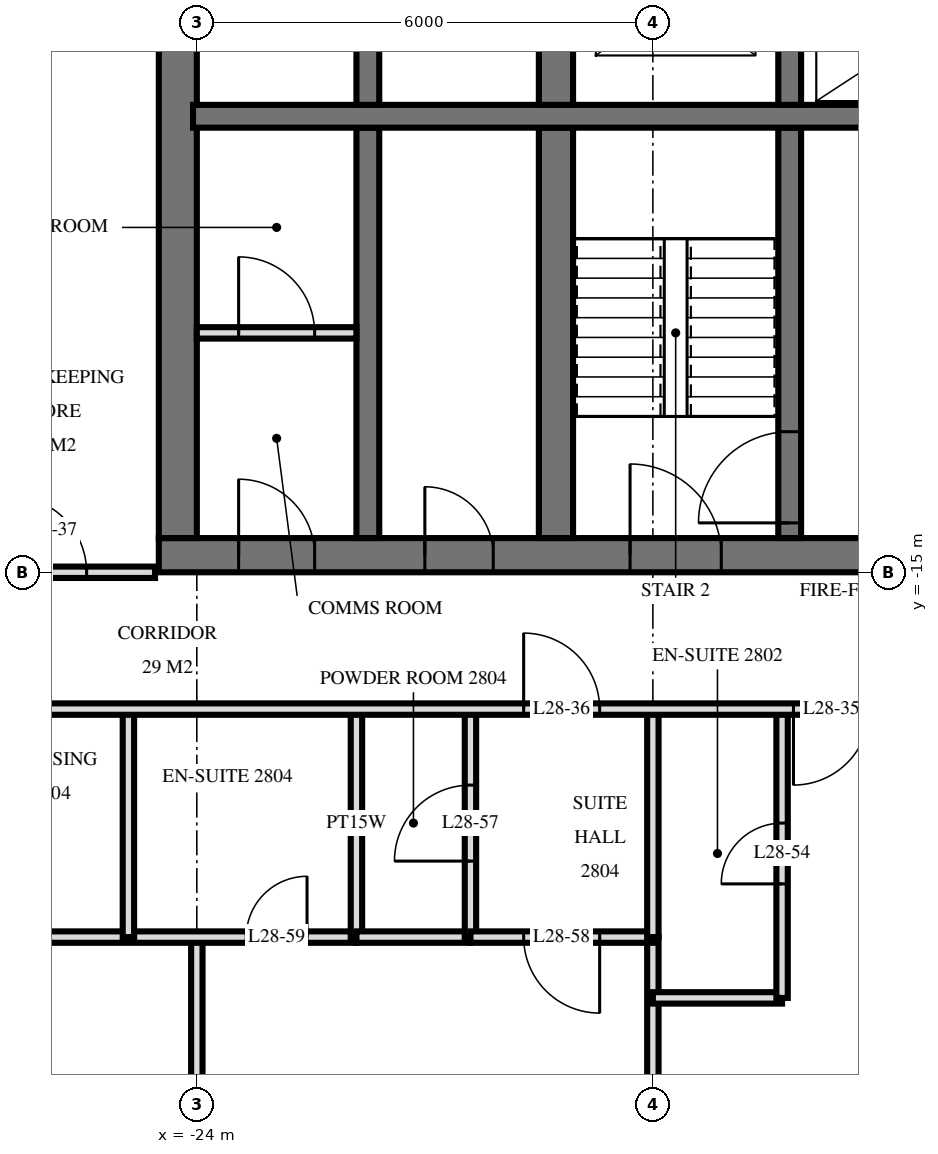
"""IFC4 building model, lengths in metres.
Left out: names, types, materials, properties, quantities, classifications, styles, units other than length and angle.
Written with IfcOpenShell. Run it as: python <this file> out.ifc"""

import sys

from ifc_helpers import new_model, si_unit, direction, frame, frame_2d, origin, place, context, subcontext, project, spatial, rectangle, extrude, element, fill, save


model = new_model("IFC4")
c1 = context("Model", 3, precision=1e-05, world=origin(), true_north=direction((0.0, 1.0)))
c2 = subcontext(c1, "Body", "Model", "MODEL_VIEW")
j1 = project(units=[si_unit("LENGTHUNIT", "METRE"), si_unit("PLANEANGLEUNIT", "RADIAN")], contexts=[c1])
p1 = place(None, origin())
s1 = spatial("IfcSite", under=j1, at=p1, CompositionType="ELEMENT")
p2 = place(p1, origin())
s2 = spatial("IfcBuilding", under=s1, at=p2, CompositionType="ELEMENT")
p3 = place(p2, frame((0.0, 0.0, 112.8)))
s3 = spatial("IfcBuildingStorey", under=s2, at=p3, CompositionType="ELEMENT", Elevation=112.8)
p4 = place(p3, frame((-24.5, -14.775, 0.0), z_axis=(0.0, 0.0, 1.0), x_axis=(1.0, 0.0, 0.0)))
e1 = element("IfcWall", 1, at=p4, inside=s3, PredefinedType="SHEAR", context=c2, shape_type="SweptSolid", body=[
    extrude(rectangle(XDim=14.5, YDim=0.45, at=frame_2d((7.25, 0.0))), origin(), (0.0, 0.0, 1.0), 3.6),
])
p5 = place(p4, frame((6.2, 0.0, 0.0)))
e2 = element("IfcOpeningElement", 2, at=p5, cuts=e1, PredefinedType="OPENING", context=c2, shape_type="SweptSolid", body=[
    extrude(rectangle(XDim=1.2, YDim=2.1, at=frame_2d((0.6, 1.05))), frame((0.0, 0.235, 0.0), z_axis=(0.0, -1.0, 0.0), x_axis=(1.0, 0.0, 0.0)), (0.0, 0.0, 1.0), 0.47),
])
p6 = place(p4, frame((9.25, 0.0, 0.0)))
e3 = element("IfcOpeningElement", 3, at=p6, cuts=e1, PredefinedType="OPENING", context=c2, shape_type="SweptSolid", body=[
    extrude(rectangle(XDim=1.1, YDim=2.1, at=frame_2d((0.55, 1.05))), frame((0.0, 0.235, 0.0), z_axis=(0.0, -1.0, 0.0), x_axis=(1.0, 0.0, 0.0)), (0.0, 0.0, 1.0), 0.47),
])
p7 = place(p4, frame((3.5, 0.0, 0.0)))
e4 = element("IfcOpeningElement", 4, at=p7, cuts=e1, PredefinedType="OPENING", context=c2, shape_type="SweptSolid", body=[
    extrude(rectangle(XDim=0.9, YDim=2.1, at=frame_2d((0.45, 1.05))), frame((0.0, 0.235, 0.0), z_axis=(0.0, -1.0, 0.0), x_axis=(1.0, 0.0, 0.0)), (0.0, 0.0, 1.0), 0.47),
])
p8 = place(p4, frame((1.05, 0.0, 0.0)))
e5 = element("IfcOpeningElement", 5, at=p8, cuts=e1, PredefinedType="OPENING", context=c2, shape_type="SweptSolid", body=[
    extrude(rectangle(XDim=1.0, YDim=2.1, at=frame_2d((0.5, 1.05))), frame((0.0, 0.235, 0.0), z_axis=(0.0, -1.0, 0.0), x_axis=(1.0, 0.0, 0.0)), (0.0, 0.0, 1.0), 0.47),
])
p9 = place(p3, frame((-24.25, -14.55, 0.0), z_axis=(0.0, 0.0, 1.0), x_axis=(0.0, 1.0, 0.0)))
e6 = element("IfcWall", 6, at=p9, inside=s3, PredefinedType="SHEAR", context=c2, shape_type="SweptSolid", body=[
    extrude(rectangle(XDim=14.1, YDim=0.5, at=frame_2d((7.05, 0.0))), origin(), (0.0, 0.0, 1.0), 3.6),
])
p10 = place(p3, frame((-24.05, -9.0, 0.0), z_axis=(0.0, 0.0, 1.0), x_axis=(1.0, 0.0, 0.0)))
e7 = element("IfcWall", 7, at=p10, inside=s3, PredefinedType="SHEAR", context=c2, shape_type="SweptSolid", body=[
    extrude(rectangle(XDim=13.7, YDim=0.3, at=frame_2d((6.85, 0.0))), origin(), (0.0, 0.0, 1.0), 3.6),
])
p11 = place(p10, frame((8.8, 0.0, 0.0)))
e8 = element("IfcOpeningElement", 8, at=p11, cuts=e7, PredefinedType="OPENING", context=c2, shape_type="SweptSolid", body=[
    extrude(rectangle(XDim=1.1, YDim=2.1, at=frame_2d((0.55, 1.05))), frame((0.0, 0.16, 0.0), z_axis=(0.0, -1.0, 0.0), x_axis=(1.0, 0.0, 0.0)), (0.0, 0.0, 1.0), 0.32),
])
p12 = place(p3, frame((-16.2, -8.85, 0.0), z_axis=(0.0, 0.0, 1.0), x_axis=(0.0, 1.0, 0.0)))
e9 = element("IfcWall", 9, at=p12, inside=s3, PredefinedType="SHEAR", context=c2, shape_type="SweptSolid", body=[
    extrude(rectangle(XDim=2.3, YDim=0.3, at=frame_2d((1.15, 0.0))), origin(), (0.0, 0.0, 1.0), 3.6),
])
p13 = place(p3, frame((-16.2, -14.55, 0.0), z_axis=(0.0, 0.0, 1.0), x_axis=(0.0, 1.0, 0.0)))
e10 = element("IfcWall", 10, at=p13, inside=s3, PredefinedType="SHEAR", context=c2, shape_type="SweptSolid", body=[
    extrude(rectangle(XDim=5.4, YDim=0.3, at=frame_2d((2.7, 0.0))), origin(), (0.0, 0.0, 1.0), 3.6),
])
p14 = place(p13, frame((0.2, 0.0, 0.0)))
e11 = element("IfcOpeningElement", 11, at=p14, cuts=e10, PredefinedType="OPENING", context=c2, shape_type="SweptSolid", body=[
    extrude(rectangle(XDim=1.2, YDim=2.1, at=frame_2d((0.6, 1.05))), frame((0.0, 0.16, 0.0), z_axis=(0.0, -1.0, 0.0), x_axis=(1.0, 0.0, 0.0)), (0.0, 0.0, 1.0), 0.32),
])
p15 = place(p3, frame((-19.275, -8.85, 0.0), z_axis=(0.0, 0.0, 1.0), x_axis=(0.0, 1.0, 0.0)))
e12 = element("IfcWall", 12, at=p15, inside=s3, PredefinedType="SHEAR", context=c2, shape_type="SweptSolid", body=[
    extrude(rectangle(XDim=2.3, YDim=0.45, at=frame_2d((1.15, 0.0))), origin(), (0.0, 0.0, 1.0), 3.6),
])
p16 = place(p3, frame((-19.275, -14.55, 0.0), z_axis=(0.0, 0.0, 1.0), x_axis=(0.0, 1.0, 0.0)))
e13 = element("IfcWall", 13, at=p16, inside=s3, PredefinedType="SHEAR", context=c2, shape_type="SweptSolid", body=[
    extrude(rectangle(XDim=5.4, YDim=0.45, at=frame_2d((2.7, 0.0))), origin(), (0.0, 0.0, 1.0), 3.6),
])
p17 = place(p3, frame((-21.75, -8.85, 0.0), z_axis=(0.0, 0.0, 1.0), x_axis=(0.0, 1.0, 0.0)))
e14 = element("IfcWall", 14, at=p17, inside=s3, PredefinedType="SHEAR", context=c2, shape_type="SweptSolid", body=[
    extrude(rectangle(XDim=2.3, YDim=0.3, at=frame_2d((1.15, 0.0))), origin(), (0.0, 0.0, 1.0), 3.6),
])
p18 = place(p3, frame((-21.75, -14.55, 0.0), z_axis=(0.0, 0.0, 1.0), x_axis=(0.0, 1.0, 0.0)))
e15 = element("IfcWall", 15, at=p18, inside=s3, PredefinedType="SHEAR", context=c2, shape_type="SweptSolid", body=[
    extrude(rectangle(XDim=5.4, YDim=0.3, at=frame_2d((2.7, 0.0))), origin(), (0.0, 0.0, 1.0), 3.6),
])
p19 = place(p3, frame((-24.0, -11.85, 0.0), z_axis=(0.0, 0.0, 1.0), x_axis=(1.0, 0.0, 0.0)))
e16 = element("IfcWall", 16, at=p19, inside=s3, PredefinedType="PARTITIONING", context=c2, shape_type="SweptSolid", body=[
    extrude(rectangle(XDim=2.1, YDim=0.15, at=frame_2d((1.05, 0.0))), origin(), (0.0, 0.0, 1.0), 3.3),
])
p20 = place(p19, frame((0.55, 0.0, 0.0)))
e17 = element("IfcOpeningElement", 17, at=p20, cuts=e16, PredefinedType="OPENING", context=c2, shape_type="SweptSolid", body=[
    extrude(rectangle(XDim=1.0, YDim=2.1, at=frame_2d((0.5, 1.05))), frame((0.0, 0.085, 0.0), z_axis=(0.0, -1.0, 0.0), x_axis=(1.0, 0.0, 0.0)), (0.0, 0.0, 1.0), 0.17),
])
p21 = place(p3, frame((-16.3, -20.6, 0.0), z_axis=(0.0, 0.0, 1.0), x_axis=(0.0, 1.0, 0.0)))
e18 = element("IfcWall", 18, at=p21, inside=s3, PredefinedType="PARTITIONING", context=c2, shape_type="SweptSolid", body=[
    extrude(rectangle(XDim=3.8, YDim=0.15, at=frame_2d((1.9, 0.0))), origin(), (0.0, 0.0, 1.0), 3.32),
])
p22 = place(p21, frame((1.5, 0.0, 0.0)))
e19 = element("IfcOpeningElement", 19, at=p22, cuts=e18, PredefinedType="OPENING", context=c2, shape_type="SweptSolid", body=[
    extrude(rectangle(XDim=0.8, YDim=2.1, at=frame_2d((0.4, 1.05))), frame((0.0, 0.085, 0.0), z_axis=(0.0, -1.0, 0.0), x_axis=(1.0, 0.0, 0.0)), (0.0, 0.0, 1.0), 0.17),
])
p23 = place(p3, frame((-18.0, -19.8, 0.0), z_axis=(0.0, 0.0, 1.0), x_axis=(0.0, 1.0, 0.0)))
e20 = element("IfcWall", 20, at=p23, inside=s3, PredefinedType="PARTITIONING", context=c2, shape_type="SweptSolid", body=[
    extrude(rectangle(XDim=3.0, YDim=0.15, at=frame_2d((1.5, 0.0))), origin(), (0.0, 0.0, 1.0), 3.32),
])
p24 = place(p3, frame((-18.0, -33.62, 0.0), z_axis=(0.0, 0.0, 1.0), x_axis=(0.0, 1.0, 0.0)))
e21 = element("IfcWall", 21, at=p24, inside=s3, PredefinedType="PARTITIONING", context=c2, shape_type="SweptSolid", body=[
    extrude(rectangle(XDim=13.82, YDim=0.15, at=frame_2d((6.91, 0.0))), origin(), (0.0, 0.0, 1.0), 3.32),
])
p25 = place(p3, frame((-20.4, -19.8, 0.0), z_axis=(0.0, 0.0, 1.0), x_axis=(0.0, 1.0, 0.0)))
e22 = element("IfcWall", 22, at=p25, inside=s3, PredefinedType="PARTITIONING", context=c2, shape_type="SweptSolid", body=[
    extrude(rectangle(XDim=3.0, YDim=0.15, at=frame_2d((1.5, 0.0))), origin(), (0.0, 0.0, 1.0), 3.32),
])
p26 = place(p25, frame((1.0, 0.0, 0.0)))
e23 = element("IfcOpeningElement", 23, at=p26, cuts=e22, PredefinedType="OPENING", context=c2, shape_type="SweptSolid", body=[
    extrude(rectangle(XDim=1.0, YDim=2.1, at=frame_2d((0.5, 1.05))), frame((0.0, 0.085, 0.0), z_axis=(0.0, -1.0, 0.0), x_axis=(1.0, 0.0, 0.0)), (0.0, 0.0, 1.0), 0.17),
])
p27 = place(p3, frame((-21.9, -19.8, 0.0), z_axis=(0.0, 0.0, 1.0), x_axis=(0.0, 1.0, 0.0)))
e24 = element("IfcWall", 24, at=p27, inside=s3, PredefinedType="PLUMBINGWALL", context=c2, shape_type="SweptSolid", body=[
    extrude(rectangle(XDim=3.0, YDim=0.15, at=frame_2d((1.5, 0.0))), origin(), (0.0, 0.0, 1.0), 3.32),
])
p28 = place(p3, frame((-24.0, -33.557, 0.0), z_axis=(0.0, 0.0, 1.0), x_axis=(0.0, 1.0, 0.0)))
e25 = element("IfcWall", 25, at=p28, inside=s3, PredefinedType="PARTITIONING", context=c2, shape_type="SweptSolid", body=[
    extrude(rectangle(XDim=13.757, YDim=0.15, at=frame_2d((6.878, 0.0))), origin(), (0.0, 0.0, 1.0), 3.32),
])
p29 = place(p28, frame((6.337, 0.0, 0.0)))
e26 = element("IfcOpeningElement", 26, at=p29, cuts=e25, PredefinedType="OPENING", context=c2, shape_type="SweptSolid", body=[
    extrude(rectangle(XDim=0.9, YDim=2.1, at=frame_2d((0.45, 1.05))), frame((0.0, 0.085, 0.0), z_axis=(0.0, -1.0, 0.0), x_axis=(1.0, 0.0, 0.0)), (0.0, 0.0, 1.0), 0.17),
])
p30 = place(p3, frame((-24.9, -19.8, 0.0), z_axis=(0.0, 0.0, 1.0), x_axis=(0.0, 1.0, 0.0)))
e27 = element("IfcWall", 27, at=p30, inside=s3, PredefinedType="PARTITIONING", context=c2, shape_type="SweptSolid", body=[
    extrude(rectangle(XDim=3.0, YDim=0.15, at=frame_2d((1.5, 0.0))), origin(), (0.0, 0.0, 1.0), 3.32),
])
p31 = place(p3, frame((-18.0, -20.6, 0.0), z_axis=(0.0, 0.0, 1.0), x_axis=(1.0, 0.0, 0.0)))
e28 = element("IfcWall", 28, at=p31, inside=s3, PredefinedType="PARTITIONING", context=c2, shape_type="SweptSolid", body=[
    extrude(rectangle(XDim=1.7, YDim=0.15, at=frame_2d((0.85, 0.0))), origin(), (0.0, 0.0, 1.0), 3.32),
])
p32 = place(p3, frame((-20.4, -19.8, 0.0), z_axis=(0.0, 0.0, 1.0), x_axis=(1.0, 0.0, 0.0)))
e29 = element("IfcWall", 29, at=p32, inside=s3, PredefinedType="PARTITIONING", context=c2, shape_type="SweptSolid", body=[
    extrude(rectangle(XDim=2.4, YDim=0.15, at=frame_2d((1.2, 0.0))), origin(), (0.0, 0.0, 1.0), 3.32),
])
p33 = place(p32, frame((0.7, 0.0, 0.0)))
e30 = element("IfcOpeningElement", 30, at=p33, cuts=e29, PredefinedType="OPENING", context=c2, shape_type="SweptSolid", body=[
    extrude(rectangle(XDim=1.0, YDim=2.1, at=frame_2d((0.5, 1.05))), frame((0.0, 0.085, 0.0), z_axis=(0.0, -1.0, 0.0), x_axis=(1.0, 0.0, 0.0)), (0.0, 0.0, 1.0), 0.17),
])
p34 = place(p3, frame((-28.02, -19.8, 0.0), z_axis=(0.0, 0.0, 1.0), x_axis=(1.0, 0.0, 0.0)))
e31 = element("IfcWall", 31, at=p34, inside=s3, PredefinedType="PARTITIONING", context=c2, shape_type="SweptSolid", body=[
    extrude(rectangle(XDim=6.12, YDim=0.15, at=frame_2d((3.06, 0.0))), origin(), (0.0, 0.0, 1.0), 3.32),
])
p35 = place(p34, frame((4.67, 0.0, 0.0)))
e32 = element("IfcOpeningElement", 32, at=p35, cuts=e31, PredefinedType="OPENING", context=c2, shape_type="SweptSolid", body=[
    extrude(rectangle(XDim=0.8, YDim=2.1, at=frame_2d((0.4, 1.05))), frame((0.0, 0.085, 0.0), z_axis=(0.0, -1.0, 0.0), x_axis=(1.0, 0.0, 0.0)), (0.0, 0.0, 1.0), 0.17),
])
p36 = place(p34, frame((1.02, 0.0, 0.0)))
e33 = element("IfcOpeningElement", 33, at=p36, cuts=e31, PredefinedType="OPENING", context=c2, shape_type="SweptSolid", body=[
    extrude(rectangle(XDim=0.9, YDim=2.1, at=frame_2d((0.45, 1.05))), frame((0.0, 0.085, 0.0), z_axis=(0.0, -1.0, 0.0), x_axis=(1.0, 0.0, 0.0)), (0.0, 0.0, 1.0), 0.17),
])
p37 = place(p3, frame((-21.9, -19.8, 0.0), z_axis=(0.0, 0.0, 1.0), x_axis=(1.0, 0.0, 0.0)))
e34 = element("IfcWall", 34, at=p37, inside=s3, PredefinedType="PLUMBINGWALL", context=c2, shape_type="SweptSolid", body=[
    extrude(rectangle(XDim=1.5, YDim=0.15, at=frame_2d((0.75, 0.0))), origin(), (0.0, 0.0, 1.0), 3.32),
])
p38 = place(p3, frame((-28.02, -16.8, 0.0), z_axis=(0.0, 0.0, 1.0), x_axis=(1.0, 0.0, 0.0)))
e35 = element("IfcWall", 35, at=p38, inside=s3, PredefinedType="PARTITIONING", context=c2, shape_type="SweptSolid", body=[
    extrude(rectangle(XDim=56.04, YDim=0.15, at=frame_2d((28.02, 0.0))), origin(), (0.0, 0.0, 1.0), 3.32),
])
p39 = place(p38, frame((13.17, 0.0, 0.0)))
e36 = element("IfcOpeningElement", 36, at=p39, cuts=e35, PredefinedType="OPENING", context=c2, shape_type="SweptSolid", body=[
    extrude(rectangle(XDim=1.0, YDim=2.1, at=frame_2d((0.5, 1.05))), frame((0.0, 0.085, 0.0), z_axis=(0.0, -1.0, 0.0), x_axis=(1.0, 0.0, 0.0)), (0.0, 0.0, 1.0), 0.17),
])
p40 = place(p38, frame((11.87, 0.0, 0.0)))
e37 = element("IfcOpeningElement", 37, at=p40, cuts=e35, PredefinedType="OPENING", context=c2, shape_type="SweptSolid", body=[
    extrude(rectangle(XDim=1.0, YDim=2.1, at=frame_2d((0.5, 1.05))), frame((0.0, 0.085, 0.0), z_axis=(0.0, -1.0, 0.0), x_axis=(1.0, 0.0, 0.0)), (0.0, 0.0, 1.0), 0.17),
])
p41 = place(p38, frame((8.32, 0.0, 0.0)))
e38 = element("IfcOpeningElement", 38, at=p41, cuts=e35, PredefinedType="OPENING", context=c2, shape_type="SweptSolid", body=[
    extrude(rectangle(XDim=1.0, YDim=2.1, at=frame_2d((0.5, 1.05))), frame((0.0, 0.085, 0.0), z_axis=(0.0, -1.0, 0.0), x_axis=(1.0, 0.0, 0.0)), (0.0, 0.0, 1.0), 0.17),
])
p42 = place(p38, frame((40.42, 0.0, 0.0)))
e39 = element("IfcOpeningElement", 39, at=p42, cuts=e35, PredefinedType="OPENING", context=c2, shape_type="SweptSolid", body=[
    extrude(rectangle(XDim=1.0, YDim=2.1, at=frame_2d((0.5, 1.05))), frame((0.0, 0.085, 0.0), z_axis=(0.0, -1.0, 0.0), x_axis=(1.0, 0.0, 0.0)), (0.0, 0.0, 1.0), 0.17),
])
p43 = place(p38, frame((46.72, 0.0, 0.0)))
e40 = element("IfcOpeningElement", 40, at=p43, cuts=e35, PredefinedType="OPENING", context=c2, shape_type="SweptSolid", body=[
    extrude(rectangle(XDim=1.0, YDim=2.1, at=frame_2d((0.5, 1.05))), frame((0.0, 0.085, 0.0), z_axis=(0.0, -1.0, 0.0), x_axis=(1.0, 0.0, 0.0)), (0.0, 0.0, 1.0), 0.17),
])
p44 = place(p38, frame((21.52, 0.0, 0.0)))
e41 = element("IfcOpeningElement", 41, at=p44, cuts=e35, PredefinedType="OPENING", context=c2, shape_type="SweptSolid", body=[
    extrude(rectangle(XDim=1.0, YDim=2.1, at=frame_2d((0.5, 1.05))), frame((0.0, 0.085, 0.0), z_axis=(0.0, -1.0, 0.0), x_axis=(1.0, 0.0, 0.0)), (0.0, 0.0, 1.0), 0.17),
])
p45 = place(p38, frame((30.52, 0.0, 0.0)))
e42 = element("IfcOpeningElement", 42, at=p45, cuts=e35, PredefinedType="OPENING", context=c2, shape_type="SweptSolid", body=[
    extrude(rectangle(XDim=1.0, YDim=2.1, at=frame_2d((0.5, 1.05))), frame((0.0, 0.085, 0.0), z_axis=(0.0, -1.0, 0.0), x_axis=(1.0, 0.0, 0.0)), (0.0, 0.0, 1.0), 0.17),
])
p46 = place(p38, frame((36.52, 0.0, 0.0)))
e43 = element("IfcOpeningElement", 43, at=p46, cuts=e35, PredefinedType="OPENING", context=c2, shape_type="SweptSolid", body=[
    extrude(rectangle(XDim=1.0, YDim=2.1, at=frame_2d((0.5, 1.05))), frame((0.0, 0.085, 0.0), z_axis=(0.0, -1.0, 0.0), x_axis=(1.0, 0.0, 0.0)), (0.0, 0.0, 1.0), 0.17),
])
p47 = place(p3, frame((-28.02, -15.0, 0.0), z_axis=(0.0, 0.0, 1.0), x_axis=(1.0, 0.0, 0.0)))
e44 = element("IfcWall", 44, at=p47, inside=s3, PredefinedType="PARTITIONING", context=c2, shape_type="SweptSolid", body=[
    extrude(rectangle(XDim=3.47, YDim=0.15, at=frame_2d((1.735, 0.0))), origin(), (0.0, 0.0, 1.0), 3.32),
])
p48 = place(p47, frame((1.57, 0.0, 0.0)))
e45 = element("IfcOpeningElement", 45, at=p48, cuts=e44, PredefinedType="OPENING", context=c2, shape_type="SweptSolid", body=[
    extrude(rectangle(XDim=1.0, YDim=2.1, at=frame_2d((0.5, 1.05))), frame((0.0, 0.085, 0.0), z_axis=(0.0, -1.0, 0.0), x_axis=(1.0, 0.0, 0.0)), (0.0, 0.0, 1.0), 0.17),
])
p49 = place(p5, origin())
e46 = element("IfcDoor", 46, at=p49, inside=s3, OperationType="SINGLE_SWING_RIGHT", PredefinedType="DOOR", context=c2, shape_type="SweptSolid", body=[
    extrude(rectangle(XDim=1.2, YDim=2.1, at=frame_2d((0.6, 1.05))), frame((0.0, 0.025, 0.0), z_axis=(0.0, -1.0, 0.0), x_axis=(1.0, 0.0, 0.0)), (0.0, 0.0, 1.0), 0.05),
])
fill(e2, e46)
p50 = place(p7, origin())
e47 = element("IfcDoor", 47, at=p50, inside=s3, OperationType="SINGLE_SWING_RIGHT", PredefinedType="DOOR", context=c2, shape_type="SweptSolid", body=[
    extrude(rectangle(XDim=0.9, YDim=2.1, at=frame_2d((0.45, 1.05))), frame((0.0, 0.025, 0.0), z_axis=(0.0, -1.0, 0.0), x_axis=(1.0, 0.0, 0.0)), (0.0, 0.0, 1.0), 0.05),
])
fill(e4, e47)
p51 = place(p8, origin())
e48 = element("IfcDoor", 48, at=p51, inside=s3, OperationType="SINGLE_SWING_RIGHT", PredefinedType="DOOR", context=c2, shape_type="SweptSolid", body=[
    extrude(rectangle(XDim=1.0, YDim=2.1, at=frame_2d((0.5, 1.05))), frame((0.0, 0.025, 0.0), z_axis=(0.0, -1.0, 0.0), x_axis=(1.0, 0.0, 0.0)), (0.0, 0.0, 1.0), 0.05),
])
fill(e5, e48)
p52 = place(p14, origin())
e49 = element("IfcDoor", 49, at=p52, inside=s3, OperationType="SINGLE_SWING_RIGHT", PredefinedType="DOOR", context=c2, shape_type="SweptSolid", body=[
    extrude(rectangle(XDim=1.2, YDim=2.1, at=frame_2d((0.6, 1.05))), frame((0.0, 0.025, 0.0), z_axis=(0.0, -1.0, 0.0), x_axis=(1.0, 0.0, 0.0)), (0.0, 0.0, 1.0), 0.05),
])
fill(e11, e49)
p53 = place(p20, origin())
e50 = element("IfcDoor", 50, at=p53, inside=s3, OperationType="SINGLE_SWING_RIGHT", PredefinedType="DOOR", context=c2, shape_type="SweptSolid", body=[
    extrude(rectangle(XDim=1.0, YDim=2.1, at=frame_2d((0.5, 1.05))), frame((0.0, 0.025, 0.0), z_axis=(0.0, -1.0, 0.0), x_axis=(1.0, 0.0, 0.0)), (0.0, 0.0, 1.0), 0.05),
])
fill(e17, e50)
p54 = place(p40, frame((0.5, 0.0, 0.0), z_axis=(0.0, 0.0, 1.0), x_axis=(-1.0, 0.0, 0.0)))
e51 = element("IfcDoor", 51, at=p54, inside=s3, OperationType="SINGLE_SWING_LEFT", PredefinedType="DOOR", context=c2, shape_type="SweptSolid", body=[
    extrude(rectangle(XDim=1.0, YDim=2.1, at=frame_2d((0.0, 1.05))), frame((0.0, -0.025, 0.0), z_axis=(0.0, 1.0, 0.0), x_axis=(-1.0, 0.0, 0.0)), (0.0, 0.0, 1.0), 0.05),
])
fill(e37, e51)
p55 = place(p41, origin())
e52 = element("IfcDoor", 52, at=p55, inside=s3, OperationType="SINGLE_SWING_RIGHT", PredefinedType="DOOR", context=c2, shape_type="SweptSolid", body=[
    extrude(rectangle(XDim=1.0, YDim=2.1, at=frame_2d((0.5, 1.05))), frame((0.0, 0.025, 0.0), z_axis=(0.0, -1.0, 0.0), x_axis=(1.0, 0.0, 0.0)), (0.0, 0.0, 1.0), 0.05),
])
fill(e38, e52)
p56 = place(p48, origin())
e53 = element("IfcDoor", 53, at=p56, inside=s3, OperationType="SINGLE_SWING_RIGHT", PredefinedType="DOOR", context=c2, shape_type="SweptSolid", body=[
    extrude(rectangle(XDim=1.0, YDim=2.1, at=frame_2d((0.5, 1.05))), frame((0.0, 0.025, 0.0), z_axis=(0.0, -1.0, 0.0), x_axis=(1.0, 0.0, 0.0)), (0.0, 0.0, 1.0), 0.05),
])
fill(e45, e53)
p57 = place(p22, origin())
e54 = element("IfcDoor", 54, at=p57, inside=s3, OperationType="SINGLE_SWING_RIGHT", PredefinedType="DOOR", context=c2, shape_type="SweptSolid", body=[
    extrude(rectangle(XDim=0.8, YDim=2.1, at=frame_2d((0.4, 1.05))), frame((0.0, 0.025, 0.0), z_axis=(0.0, -1.0, 0.0), x_axis=(1.0, 0.0, 0.0)), (0.0, 0.0, 1.0), 0.05),
])
fill(e19, e54)
p58 = place(p26, origin())
e55 = element("IfcDoor", 55, at=p58, inside=s3, OperationType="SINGLE_SWING_RIGHT", PredefinedType="DOOR", context=c2, shape_type="SweptSolid", body=[
    extrude(rectangle(XDim=1.0, YDim=2.1, at=frame_2d((0.5, 1.05))), frame((0.0, 0.025, 0.0), z_axis=(0.0, -1.0, 0.0), x_axis=(1.0, 0.0, 0.0)), (0.0, 0.0, 1.0), 0.05),
])
fill(e23, e55)
p59 = place(p33, frame((0.5, 0.0, 0.0), z_axis=(0.0, 0.0, 1.0), x_axis=(-1.0, 0.0, 0.0)))
e56 = element("IfcDoor", 56, at=p59, inside=s3, OperationType="SINGLE_SWING_RIGHT", PredefinedType="DOOR", context=c2, shape_type="SweptSolid", body=[
    extrude(rectangle(XDim=1.0, YDim=2.1, at=frame_2d((0.0, 1.05))), frame((0.0, -0.025, 0.0), z_axis=(0.0, 1.0, 0.0), x_axis=(-1.0, 0.0, 0.0)), (0.0, 0.0, 1.0), 0.05),
])
fill(e30, e56)
p60 = place(p35, origin())
e57 = element("IfcDoor", 57, at=p60, inside=s3, OperationType="SINGLE_SWING_LEFT", PredefinedType="DOOR", context=c2, shape_type="SweptSolid", body=[
    extrude(rectangle(XDim=0.8, YDim=2.1, at=frame_2d((0.4, 1.05))), frame((0.0, 0.025, 0.0), z_axis=(0.0, -1.0, 0.0), x_axis=(1.0, 0.0, 0.0)), (0.0, 0.0, 1.0), 0.05),
])
fill(e32, e57)
save(model, sys.argv[1])
